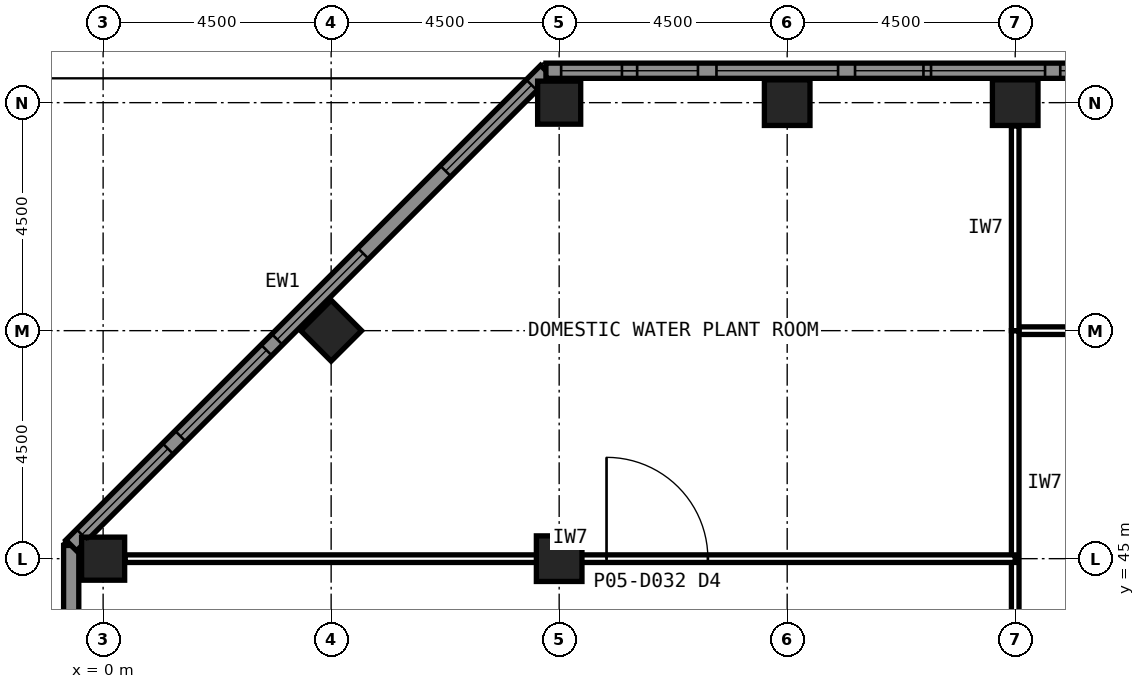
"""IFC4 building model, lengths in metres.
Left out: names, types, materials, properties, quantities, classifications, styles, units other than length and angle.
Written with IfcOpenShell. Run it as: python <this file> out.ifc"""

import sys

from ifc_helpers import new_model, si_unit, direction, frame, frame_2d, origin, origin_2d, place, context, subcontext, project, spatial, rectangle, hollow_rectangle, extrude, element, fill, save


model = new_model("IFC4")
c1 = context("Model", 3, precision=1e-05, world=origin(), true_north=direction((0.0, 1.0)))
c2 = subcontext(c1, "Body", "Model", "MODEL_VIEW")
j1 = project(units=[si_unit("LENGTHUNIT", "METRE"), si_unit("PLANEANGLEUNIT", "RADIAN")], contexts=[c1])
p1 = place(None, origin())
s1 = spatial("IfcSite", under=j1, at=p1, CompositionType="ELEMENT")
p2 = place(p1, origin())
s2 = spatial("IfcBuilding", under=s1, at=p2, CompositionType="ELEMENT")
p3 = place(p2, frame((0.0, 0.0, 23.0)))
s3 = spatial("IfcBuildingStorey", under=s2, at=p3, CompositionType="ELEMENT", Elevation=23.0)
for number, where, z_axis, x_axis in (
    (1, (18.0, 54.0, 0.0), (0.0, 0.0, 1.0), (1.0, 0.0, 0.0)),
    (2, (13.5, 54.0, 0.0), (0.0, 0.0, 1.0), (1.0, 0.0, 0.0)),
):
    element("IfcColumn", number, at=place(p3, frame(where, z_axis=z_axis, x_axis=x_axis)), inside=s3, PredefinedType="COLUMN", context=c2, shape_type="SweptSolid", body=[
        extrude(hollow_rectangle(XDim=0.9, YDim=0.9, WallThickness=0.063, at=origin_2d()), origin(), (0.0, 0.0, 1.0), 6.0),
    ])
for number, where, z_axis, x_axis in (
    (3, (9.0, 54.0, 0.0), (0.0, 0.0, 1.0), (1.0, 0.0, 0.0)),
    (4, (0.0, 45.0, 0.0), (0.0, 0.0, 1.0), (1.0, 0.0, 0.0)),
    (5, (4.5, 49.5, 0.0), (0.0, 0.0, 1.0), (0.707, 0.707, 0.0)),
):
    element("IfcColumn", number, at=place(p3, frame(where, z_axis=z_axis, x_axis=x_axis)), inside=s3, PredefinedType="COLUMN", context=c2, shape_type="SweptSolid", body=[
        extrude(hollow_rectangle(XDim=0.85, YDim=0.85, WallThickness=0.05, at=origin_2d()), origin(), (0.0, 0.0, 1.0), 6.0),
    ])
p4 = place(p3, frame((9.0, 45.0, 0.0), z_axis=(0.0, 0.0, 1.0), x_axis=(1.0, 0.0, 0.0)))
e6 = element("IfcColumn", 6, at=p4, inside=s3, PredefinedType="COLUMN", context=c2, shape_type="SweptSolid", body=[
    extrude(hollow_rectangle(XDim=0.9, YDim=0.9, WallThickness=0.063, at=origin_2d()), origin(), (0.0, 0.0, 1.0), 6.0),
])
p5 = place(p3, frame((-0.63, 8.739, 0.0), z_axis=(0.0, 0.0, 1.0), x_axis=(0.0, 1.0, 0.0)))
e7 = element("IfcWall", 7, at=p5, inside=s3, PredefinedType="SOLIDWALL", context=c2, shape_type="SweptSolid", body=[
    extrude(rectangle(XDim=36.522, YDim=0.3, at=frame_2d((18.261, 0.0))), origin(), (0.0, 0.0, 1.0), 6.0),
])
p6 = place(p5, frame((16.011, 0.0, 0.0)))
e8 = element("IfcOpeningElement", 8, at=p6, cuts=e7, PredefinedType="OPENING", context=c2, shape_type="SweptSolid", body=[
    extrude(rectangle(XDim=1.0, YDim=2.1, at=frame_2d((0.5, 1.05))), frame((0.0, 0.16, 0.0), z_axis=(0.0, -1.0, 0.0), x_axis=(1.0, 0.0, 0.0)), (0.0, 0.0, 1.0), 0.32),
])
p7 = place(p5, frame((0.3, 0.0, 0.3)))
e9 = element("IfcOpeningElement", 9, at=p7, cuts=e7, PredefinedType="OPENING", context=c2, shape_type="SweptSolid", body=[
    extrude(rectangle(XDim=1.5, YDim=2.0, at=frame_2d((0.75, 1.0))), frame((0.0, 0.16, 0.0), z_axis=(0.0, -1.0, 0.0), x_axis=(1.0, 0.0, 0.0)), (0.0, 0.0, 1.0), 0.32),
])
p8 = place(p5, frame((3.365, 0.0, 1.2)))
e10 = element("IfcOpeningElement", 10, at=p8, cuts=e7, PredefinedType="OPENING", context=c2, shape_type="SweptSolid", body=[
    extrude(rectangle(XDim=2.4, YDim=3.0, at=frame_2d((1.2, 1.5))), frame((0.0, 0.16, 0.0), z_axis=(0.0, -1.0, 0.0), x_axis=(1.0, 0.0, 0.0)), (0.0, 0.0, 1.0), 0.32),
])
p9 = place(p5, frame((1.5, 0.0, 3.65)))
e11 = element("IfcOpeningElement", 11, at=p9, cuts=e7, PredefinedType="OPENING", context=c2, shape_type="SweptSolid", body=[
    extrude(rectangle(XDim=1.5, YDim=2.0, at=frame_2d((0.75, 1.0))), frame((0.0, 0.16, 0.0), z_axis=(0.0, -1.0, 0.0), x_axis=(1.0, 0.0, 0.0)), (0.0, 0.0, 1.0), 0.32),
])
p10 = place(p5, frame((6.1, 0.0, 3.6)))
e12 = element("IfcOpeningElement", 12, at=p10, cuts=e7, PredefinedType="OPENING", context=c2, shape_type="SweptSolid", body=[
    extrude(rectangle(XDim=1.5, YDim=2.0, at=frame_2d((0.75, 1.0))), frame((0.0, 0.16, 0.0), z_axis=(0.0, -1.0, 0.0), x_axis=(1.0, 0.0, 0.0)), (0.0, 0.0, 1.0), 0.32),
])
p11 = place(p5, frame((12.496, 0.0, 1.2)))
e13 = element("IfcOpeningElement", 13, at=p11, cuts=e7, PredefinedType="OPENING", context=c2, shape_type="SweptSolid", body=[
    extrude(rectangle(XDim=2.4, YDim=3.0, at=frame_2d((1.2, 1.5))), frame((0.0, 0.16, 0.0), z_axis=(0.0, -1.0, 0.0), x_axis=(1.0, 0.0, 0.0)), (0.0, 0.0, 1.0), 0.32),
])
p12 = place(p5, frame((7.45, 0.0, 0.3)))
e14 = element("IfcOpeningElement", 14, at=p12, cuts=e7, PredefinedType="OPENING", context=c2, shape_type="SweptSolid", body=[
    extrude(rectangle(XDim=2.4, YDim=3.0, at=frame_2d((1.2, 1.5))), frame((0.0, 0.16, 0.0), z_axis=(0.0, -1.0, 0.0), x_axis=(1.0, 0.0, 0.0)), (0.0, 0.0, 1.0), 0.32),
])
p13 = place(p5, frame((21.626, 0.0, 1.2)))
e15 = element("IfcOpeningElement", 15, at=p13, cuts=e7, PredefinedType="OPENING", context=c2, shape_type="SweptSolid", body=[
    extrude(rectangle(XDim=2.4, YDim=3.0, at=frame_2d((1.2, 1.5))), frame((0.0, 0.16, 0.0), z_axis=(0.0, -1.0, 0.0), x_axis=(1.0, 0.0, 0.0)), (0.0, 0.0, 1.0), 0.32),
])
p14 = place(p5, frame((10.15, 0.0, 0.3)))
e16 = element("IfcOpeningElement", 16, at=p14, cuts=e7, PredefinedType="OPENING", context=c2, shape_type="SweptSolid", body=[
    extrude(rectangle(XDim=1.5, YDim=2.0, at=frame_2d((0.75, 1.0))), frame((0.0, 0.16, 0.0), z_axis=(0.0, -1.0, 0.0), x_axis=(1.0, 0.0, 0.0)), (0.0, 0.0, 1.0), 0.32),
])
p15 = place(p5, frame((17.35, 0.0, 0.3)))
e17 = element("IfcOpeningElement", 17, at=p15, cuts=e7, PredefinedType="OPENING", context=c2, shape_type="SweptSolid", body=[
    extrude(rectangle(XDim=2.4, YDim=3.0, at=frame_2d((1.2, 1.5))), frame((0.0, 0.16, 0.0), z_axis=(0.0, -1.0, 0.0), x_axis=(1.0, 0.0, 0.0)), (0.0, 0.0, 1.0), 0.32),
])
p16 = place(p5, frame((30.757, 0.0, 1.2)))
e18 = element("IfcOpeningElement", 18, at=p16, cuts=e7, PredefinedType="OPENING", context=c2, shape_type="SweptSolid", body=[
    extrude(rectangle(XDim=2.4, YDim=3.0, at=frame_2d((1.2, 1.5))), frame((0.0, 0.16, 0.0), z_axis=(0.0, -1.0, 0.0), x_axis=(1.0, 0.0, 0.0)), (0.0, 0.0, 1.0), 0.32),
])
p17 = place(p5, frame((25.45, 0.0, 0.3)))
e19 = element("IfcOpeningElement", 19, at=p17, cuts=e7, PredefinedType="OPENING", context=c2, shape_type="SweptSolid", body=[
    extrude(rectangle(XDim=2.4, YDim=3.0, at=frame_2d((1.2, 1.5))), frame((0.0, 0.16, 0.0), z_axis=(0.0, -1.0, 0.0), x_axis=(1.0, 0.0, 0.0)), (0.0, 0.0, 1.0), 0.32),
])
p18 = place(p3, frame((-0.63, 45.261, 0.0), z_axis=(0.0, 0.0, 1.0), x_axis=(0.707106781187, 0.707106781187, 0.0)))
e20 = element("IfcWall", 20, at=p18, inside=s3, PredefinedType="SOLIDWALL", context=c2, shape_type="SweptSolid", body=[
    extrude(rectangle(XDim=13.25, YDim=0.3, at=frame_2d((6.625, 0.0))), origin(), (0.0, 0.0, 1.0), 6.0),
])
p19 = place(p18, frame((0.3, 0.0, 0.3)))
e21 = element("IfcOpeningElement", 21, at=p19, cuts=e20, PredefinedType="OPENING", context=c2, shape_type="SweptSolid", body=[
    extrude(rectangle(XDim=2.4, YDim=3.0, at=frame_2d((1.2, 1.5))), frame((0.0, 0.16, 0.0), z_axis=(0.0, -1.0, 0.0), x_axis=(1.0, 0.0, 0.0)), (0.0, 0.0, 1.0), 0.32),
])
p20 = place(p18, frame((3.05, 0.0, 2.7)))
e22 = element("IfcOpeningElement", 22, at=p20, cuts=e20, PredefinedType="OPENING", context=c2, shape_type="SweptSolid", body=[
    extrude(rectangle(XDim=2.4, YDim=3.0, at=frame_2d((1.2, 1.5))), frame((0.0, 0.16, 0.0), z_axis=(0.0, -1.0, 0.0), x_axis=(1.0, 0.0, 0.0)), (0.0, 0.0, 1.0), 0.32),
])
p21 = place(p18, frame((5.75, 0.0, 0.75)))
e23 = element("IfcOpeningElement", 23, at=p21, cuts=e20, PredefinedType="OPENING", context=c2, shape_type="SweptSolid", body=[
    extrude(rectangle(XDim=2.4, YDim=3.0, at=frame_2d((1.2, 1.5))), frame((0.0, 0.16, 0.0), z_axis=(0.0, -1.0, 0.0), x_axis=(1.0, 0.0, 0.0)), (0.0, 0.0, 1.0), 0.32),
])
p22 = place(p18, frame((10.45, 0.0, 0.3)))
e24 = element("IfcOpeningElement", 24, at=p22, cuts=e20, PredefinedType="OPENING", context=c2, shape_type="SweptSolid", body=[
    extrude(rectangle(XDim=2.4, YDim=3.0, at=frame_2d((1.2, 1.5))), frame((0.0, 0.16, 0.0), z_axis=(0.0, -1.0, 0.0), x_axis=(1.0, 0.0, 0.0)), (0.0, 0.0, 1.0), 0.32),
])
p23 = place(p3, frame((8.739, 54.63, 0.0), z_axis=(0.0, 0.0, 1.0), x_axis=(1.0, 0.0, 0.0)))
e25 = element("IfcWall", 25, at=p23, inside=s3, PredefinedType="SOLIDWALL", context=c2, shape_type="SweptSolid", body=[
    extrude(rectangle(XDim=36.522, YDim=0.3, at=frame_2d((18.261, 0.0))), origin(), (0.0, 0.0, 1.0), 6.0),
])
p24 = place(p23, frame((0.3, 0.0, 0.3)))
e26 = element("IfcOpeningElement", 26, at=p24, cuts=e25, PredefinedType="OPENING", context=c2, shape_type="SweptSolid", body=[
    extrude(rectangle(XDim=1.5, YDim=2.0, at=frame_2d((0.75, 1.0))), frame((0.0, 0.16, 0.0), z_axis=(0.0, -1.0, 0.0), x_axis=(1.0, 0.0, 0.0)), (0.0, 0.0, 1.0), 0.32),
])
p25 = place(p23, frame((3.365, 0.0, 1.2)))
e27 = element("IfcOpeningElement", 27, at=p25, cuts=e25, PredefinedType="OPENING", context=c2, shape_type="SweptSolid", body=[
    extrude(rectangle(XDim=2.4, YDim=3.0, at=frame_2d((1.2, 1.5))), frame((0.0, 0.16, 0.0), z_axis=(0.0, -1.0, 0.0), x_axis=(1.0, 0.0, 0.0)), (0.0, 0.0, 1.0), 0.32),
])
p26 = place(p23, frame((1.5, 0.0, 3.65)))
e28 = element("IfcOpeningElement", 28, at=p26, cuts=e25, PredefinedType="OPENING", context=c2, shape_type="SweptSolid", body=[
    extrude(rectangle(XDim=1.5, YDim=2.0, at=frame_2d((0.75, 1.0))), frame((0.0, 0.16, 0.0), z_axis=(0.0, -1.0, 0.0), x_axis=(1.0, 0.0, 0.0)), (0.0, 0.0, 1.0), 0.32),
])
p27 = place(p23, frame((6.1, 0.0, 3.6)))
e29 = element("IfcOpeningElement", 29, at=p27, cuts=e25, PredefinedType="OPENING", context=c2, shape_type="SweptSolid", body=[
    extrude(rectangle(XDim=1.5, YDim=2.0, at=frame_2d((0.75, 1.0))), frame((0.0, 0.16, 0.0), z_axis=(0.0, -1.0, 0.0), x_axis=(1.0, 0.0, 0.0)), (0.0, 0.0, 1.0), 0.32),
])
p28 = place(p23, frame((12.496, 0.0, 1.2)))
e30 = element("IfcOpeningElement", 30, at=p28, cuts=e25, PredefinedType="OPENING", context=c2, shape_type="SweptSolid", body=[
    extrude(rectangle(XDim=2.4, YDim=3.0, at=frame_2d((1.2, 1.5))), frame((0.0, 0.16, 0.0), z_axis=(0.0, -1.0, 0.0), x_axis=(1.0, 0.0, 0.0)), (0.0, 0.0, 1.0), 0.32),
])
p29 = place(p23, frame((7.45, 0.0, 0.3)))
e31 = element("IfcOpeningElement", 31, at=p29, cuts=e25, PredefinedType="OPENING", context=c2, shape_type="SweptSolid", body=[
    extrude(rectangle(XDim=2.4, YDim=3.0, at=frame_2d((1.2, 1.5))), frame((0.0, 0.16, 0.0), z_axis=(0.0, -1.0, 0.0), x_axis=(1.0, 0.0, 0.0)), (0.0, 0.0, 1.0), 0.32),
])
p30 = place(p23, frame((10.15, 0.0, 0.3)))
e32 = element("IfcOpeningElement", 32, at=p30, cuts=e25, PredefinedType="OPENING", context=c2, shape_type="SweptSolid", body=[
    extrude(rectangle(XDim=1.5, YDim=2.0, at=frame_2d((0.75, 1.0))), frame((0.0, 0.16, 0.0), z_axis=(0.0, -1.0, 0.0), x_axis=(1.0, 0.0, 0.0)), (0.0, 0.0, 1.0), 0.32),
])
p31 = place(p23, frame((21.626, 0.0, 1.2)))
e33 = element("IfcOpeningElement", 33, at=p31, cuts=e25, PredefinedType="OPENING", context=c2, shape_type="SweptSolid", body=[
    extrude(rectangle(XDim=2.4, YDim=3.0, at=frame_2d((1.2, 1.5))), frame((0.0, 0.16, 0.0), z_axis=(0.0, -1.0, 0.0), x_axis=(1.0, 0.0, 0.0)), (0.0, 0.0, 1.0), 0.32),
])
p32 = place(p23, frame((10.5, 0.0, 3.65)))
e34 = element("IfcOpeningElement", 34, at=p32, cuts=e25, PredefinedType="OPENING", context=c2, shape_type="SweptSolid", body=[
    extrude(rectangle(XDim=1.5, YDim=2.0, at=frame_2d((0.75, 1.0))), frame((0.0, 0.16, 0.0), z_axis=(0.0, -1.0, 0.0), x_axis=(1.0, 0.0, 0.0)), (0.0, 0.0, 1.0), 0.32),
])
p33 = place(p23, frame((16.45, 0.0, 0.3)))
e35 = element("IfcOpeningElement", 35, at=p33, cuts=e25, PredefinedType="OPENING", context=c2, shape_type="SweptSolid", body=[
    extrude(rectangle(XDim=2.4, YDim=3.0, at=frame_2d((1.2, 1.5))), frame((0.0, 0.16, 0.0), z_axis=(0.0, -1.0, 0.0), x_axis=(1.0, 0.0, 0.0)), (0.0, 0.0, 1.0), 0.32),
])
p34 = place(p23, frame((30.757, 0.0, 1.2)))
e36 = element("IfcOpeningElement", 36, at=p34, cuts=e25, PredefinedType="OPENING", context=c2, shape_type="SweptSolid", body=[
    extrude(rectangle(XDim=2.4, YDim=3.0, at=frame_2d((1.2, 1.5))), frame((0.0, 0.16, 0.0), z_axis=(0.0, -1.0, 0.0), x_axis=(1.0, 0.0, 0.0)), (0.0, 0.0, 1.0), 0.32),
])
p35 = place(p23, frame((25.45, 0.0, 0.3)))
e37 = element("IfcOpeningElement", 37, at=p35, cuts=e25, PredefinedType="OPENING", context=c2, shape_type="SweptSolid", body=[
    extrude(rectangle(XDim=2.4, YDim=3.0, at=frame_2d((1.2, 1.5))), frame((0.0, 0.16, 0.0), z_axis=(0.0, -1.0, 0.0), x_axis=(1.0, 0.0, 0.0)), (0.0, 0.0, 1.0), 0.32),
])
p36 = place(p3, frame((36.0, 49.5, 0.0), z_axis=(0.0, 0.0, 1.0), x_axis=(-1.0, 0.0, 0.0)))
e38 = element("IfcWall", 38, at=p36, inside=s3, PredefinedType="PARTITIONING", context=c2, shape_type="SweptSolid", body=[
    extrude(rectangle(XDim=18.0, YDim=0.15, at=frame_2d((9.0, 0.0))), origin(), (0.0, 0.0, 1.0), 5.84),
])
p37 = place(p36, frame((8.0, 0.0, 0.0)))
e39 = element("IfcOpeningElement", 39, at=p37, cuts=e38, PredefinedType="OPENING", context=c2, shape_type="SweptSolid", body=[
    extrude(rectangle(XDim=2.0, YDim=2.4, at=frame_2d((1.0, 1.2))), frame((0.0, 0.085, 0.0), z_axis=(0.0, -1.0, 0.0), x_axis=(1.0, 0.0, 0.0)), (0.0, 0.0, 1.0), 0.17),
])
p38 = place(p3, frame((18.0, 49.5, 0.0), z_axis=(0.0, 0.0, 1.0), x_axis=(0.0, -1.0, 0.0)))
e40 = element("IfcWall", 40, at=p38, inside=s3, PredefinedType="PARTITIONING", context=c2, shape_type="SweptSolid", body=[
    extrude(rectangle(XDim=6.0, YDim=0.15, at=frame_2d((3.0, 0.0))), origin(), (0.0, 0.0, 1.0), 4.989),
])
p39 = place(p3, frame((0.435, 45.0, 0.0), z_axis=(0.0, 0.0, 1.0), x_axis=(1.0, 0.0, 0.0)))
e41 = element("IfcWall", 41, at=p39, inside=s3, PredefinedType="PARTITIONING", context=c2, shape_type="SweptSolid", body=[
    extrude(rectangle(XDim=17.565, YDim=0.15, at=frame_2d((8.782, 0.0))), origin(), (0.0, 0.0, 1.0), 5.229),
])
p40 = place(p39, frame((9.5, 0.0, 0.0)))
e42 = element("IfcOpeningElement", 42, at=p40, cuts=e41, PredefinedType="OPENING", context=c2, shape_type="SweptSolid", body=[
    extrude(rectangle(XDim=2.0, YDim=2.4, at=frame_2d((1.0, 1.2))), frame((0.0, 0.085, 0.0), z_axis=(0.0, -1.0, 0.0), x_axis=(1.0, 0.0, 0.0)), (0.0, 0.0, 1.0), 0.17),
])
p41 = place(p3, frame((18.0, 49.5, 0.0), z_axis=(0.0, 0.0, 1.0), x_axis=(0.0, 1.0, 0.0)))
e43 = element("IfcWall", 43, at=p41, inside=s3, PredefinedType="PARTITIONING", context=c2, shape_type="SweptSolid", body=[
    extrude(rectangle(XDim=4.04, YDim=0.15, at=frame_2d((2.02, 0.0))), origin(), (0.0, 0.0, 1.0), 4.989),
])
p42 = place(p19, origin())
e44 = element("IfcWindow", 44, at=p42, inside=s3, PartitioningType="SINGLE_PANEL", PredefinedType="USERDEFINED", context=c2, shape_type="SweptSolid", body=[
    extrude(rectangle(XDim=2.4, YDim=3.0, at=frame_2d((1.2, 1.5))), frame((0.0, 0.03, 0.0), z_axis=(0.0, -1.0, 0.0), x_axis=(1.0, 0.0, 0.0)), (0.0, 0.0, 1.0), 0.06),
])
fill(e21, e44)
p43 = place(p20, origin())
e45 = element("IfcWindow", 45, at=p43, inside=s3, PartitioningType="SINGLE_PANEL", PredefinedType="USERDEFINED", context=c2, shape_type="SweptSolid", body=[
    extrude(rectangle(XDim=2.4, YDim=3.0, at=frame_2d((1.2, 1.5))), frame((0.0, 0.03, 0.0), z_axis=(0.0, -1.0, 0.0), x_axis=(1.0, 0.0, 0.0)), (0.0, 0.0, 1.0), 0.06),
])
fill(e22, e45)
p44 = place(p21, origin())
e46 = element("IfcWindow", 46, at=p44, inside=s3, PartitioningType="SINGLE_PANEL", PredefinedType="USERDEFINED", context=c2, shape_type="SweptSolid", body=[
    extrude(rectangle(XDim=2.4, YDim=3.0, at=frame_2d((1.2, 1.5))), frame((0.0, 0.03, 0.0), z_axis=(0.0, -1.0, 0.0), x_axis=(1.0, 0.0, 0.0)), (0.0, 0.0, 1.0), 0.06),
])
fill(e23, e46)
p45 = place(p22, origin())
e47 = element("IfcWindow", 47, at=p45, inside=s3, PartitioningType="SINGLE_PANEL", PredefinedType="USERDEFINED", context=c2, shape_type="SweptSolid", body=[
    extrude(rectangle(XDim=2.4, YDim=3.0, at=frame_2d((1.2, 1.5))), frame((0.0, 0.03, 0.0), z_axis=(0.0, -1.0, 0.0), x_axis=(1.0, 0.0, 0.0)), (0.0, 0.0, 1.0), 0.06),
])
fill(e24, e47)
p46 = place(p24, origin())
e48 = element("IfcWindow", 48, at=p46, inside=s3, PartitioningType="SINGLE_PANEL", PredefinedType="USERDEFINED", context=c2, shape_type="SweptSolid", body=[
    extrude(rectangle(XDim=1.5, YDim=2.0, at=frame_2d((0.75, 1.0))), frame((0.0, 0.03, 0.0), z_axis=(0.0, -1.0, 0.0), x_axis=(1.0, 0.0, 0.0)), (0.0, 0.0, 1.0), 0.06),
])
fill(e26, e48)
p47 = place(p25, origin())
e49 = element("IfcWindow", 49, at=p47, inside=s3, PartitioningType="SINGLE_PANEL", PredefinedType="USERDEFINED", context=c2, shape_type="SweptSolid", body=[
    extrude(rectangle(XDim=2.4, YDim=3.0, at=frame_2d((1.2, 1.5))), frame((0.0, 0.03, 0.0), z_axis=(0.0, -1.0, 0.0), x_axis=(1.0, 0.0, 0.0)), (0.0, 0.0, 1.0), 0.06),
])
fill(e27, e49)
p48 = place(p26, origin())
e50 = element("IfcWindow", 50, at=p48, inside=s3, PartitioningType="SINGLE_PANEL", PredefinedType="USERDEFINED", context=c2, shape_type="SweptSolid", body=[
    extrude(rectangle(XDim=1.5, YDim=2.0, at=frame_2d((0.75, 1.0))), frame((0.0, 0.03, 0.0), z_axis=(0.0, -1.0, 0.0), x_axis=(1.0, 0.0, 0.0)), (0.0, 0.0, 1.0), 0.06),
])
fill(e28, e50)
p49 = place(p27, origin())
e51 = element("IfcWindow", 51, at=p49, inside=s3, PartitioningType="SINGLE_PANEL", PredefinedType="USERDEFINED", context=c2, shape_type="SweptSolid", body=[
    extrude(rectangle(XDim=1.5, YDim=2.0, at=frame_2d((0.75, 1.0))), frame((0.0, 0.03, 0.0), z_axis=(0.0, -1.0, 0.0), x_axis=(1.0, 0.0, 0.0)), (0.0, 0.0, 1.0), 0.06),
])
fill(e29, e51)
p50 = place(p29, origin())
e52 = element("IfcWindow", 52, at=p50, inside=s3, PartitioningType="SINGLE_PANEL", PredefinedType="USERDEFINED", context=c2, shape_type="SweptSolid", body=[
    extrude(rectangle(XDim=2.4, YDim=3.0, at=frame_2d((1.2, 1.5))), frame((0.0, 0.03, 0.0), z_axis=(0.0, -1.0, 0.0), x_axis=(1.0, 0.0, 0.0)), (0.0, 0.0, 1.0), 0.06),
])
fill(e31, e52)
p51 = place(p30, origin())
e53 = element("IfcWindow", 53, at=p51, inside=s3, PartitioningType="SINGLE_PANEL", PredefinedType="USERDEFINED", context=c2, shape_type="SweptSolid", body=[
    extrude(rectangle(XDim=1.5, YDim=2.0, at=frame_2d((0.75, 1.0))), frame((0.0, 0.03, 0.0), z_axis=(0.0, -1.0, 0.0), x_axis=(1.0, 0.0, 0.0)), (0.0, 0.0, 1.0), 0.06),
])
fill(e32, e53)
p52 = place(p40, origin())
e54 = element("IfcDoor", 54, at=p52, inside=s3, OperationType="SINGLE_SWING_LEFT", PredefinedType="DOOR", context=c2, shape_type="SweptSolid", body=[
    extrude(rectangle(XDim=2.0, YDim=2.4, at=frame_2d((1.0, 1.2))), frame((0.0, 0.025, 0.0), z_axis=(0.0, -1.0, 0.0), x_axis=(1.0, 0.0, 0.0)), (0.0, 0.0, 1.0), 0.05),
])
fill(e42, e54)
save(model, sys.argv[1])
